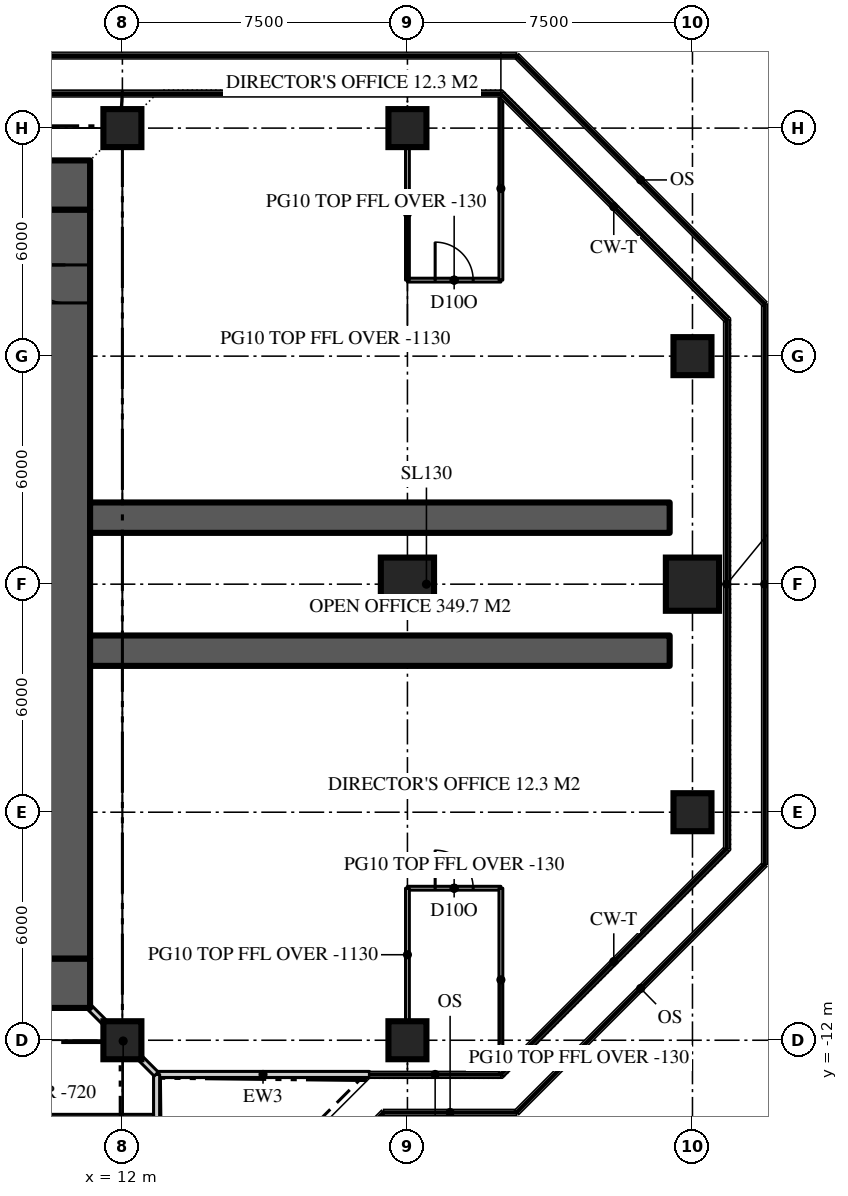
"""IFC4 building model, lengths in metres.
Left out: names, types, materials, properties, quantities, classifications, styles, units other than length and angle.
Written with IfcOpenShell. Run it as: python <this file> out.ifc"""

import sys

from ifc_helpers import new_model, si_unit, direction, frame, frame_2d, origin, origin_2d, place, context, subcontext, project, spatial, rectangle, extrude, element, fill, save


model = new_model("IFC4")
c1 = context("Model", 3, precision=1e-05, world=origin(), true_north=direction((0.0, 1.0)))
c2 = subcontext(c1, "Body", "Model", "MODEL_VIEW")
j1 = project(units=[si_unit("LENGTHUNIT", "METRE"), si_unit("PLANEANGLEUNIT", "RADIAN")], contexts=[c1])
p1 = place(None, origin())
s1 = spatial("IfcSite", under=j1, at=p1, CompositionType="ELEMENT")
p2 = place(p1, origin())
s2 = spatial("IfcBuilding", under=s1, at=p2, CompositionType="ELEMENT")
p3 = place(p2, frame((0.0, 0.0, 282.9)))
s3 = spatial("IfcBuildingStorey", under=s2, at=p3, CompositionType="ELEMENT", Elevation=282.9)
p4 = place(p3, frame((-11.15, 10.5, 0.0), z_axis=(0.0, 0.0, 1.0), x_axis=(1.0, 0.0, 0.0)))
e1 = element("IfcWall", 1, at=p4, inside=s3, PredefinedType="SHEAR", context=c2, shape_type="SweptSolid", body=[
    extrude(rectangle(XDim=22.3, YDim=1.3, at=frame_2d((11.15, 0.0))), origin(), (0.0, 0.0, 1.0), 3.9),
])
p5 = place(p4, frame((4.25, 0.0, 0.0)))
e2 = element("IfcOpeningElement", 2, at=p5, cuts=e1, PredefinedType="OPENING", context=c2, shape_type="SweptSolid", body=[
    extrude(rectangle(XDim=1.8, YDim=2.2, at=frame_2d((0.9, 1.1))), frame((0.0, 0.66, 0.0), z_axis=(0.0, -1.0, 0.0), x_axis=(1.0, 0.0, 0.0)), (0.0, 0.0, 1.0), 1.32),
])
p6 = place(p4, frame((16.25, 0.0, 0.0)))
e3 = element("IfcOpeningElement", 3, at=p6, cuts=e1, PredefinedType="OPENING", context=c2, shape_type="SweptSolid", body=[
    extrude(rectangle(XDim=1.8, YDim=2.2, at=frame_2d((0.9, 1.1))), frame((0.0, 0.66, 0.0), z_axis=(0.0, -1.0, 0.0), x_axis=(1.0, 0.0, 0.0)), (0.0, 0.0, 1.0), 1.32),
])
p7 = place(p3, frame((11.15, -10.5, 0.0), z_axis=(0.0, 0.0, 1.0), x_axis=(-1.0, 0.0, 0.0)))
e4 = element("IfcWall", 4, at=p7, inside=s3, PredefinedType="SHEAR", context=c2, shape_type="SweptSolid", body=[
    extrude(rectangle(XDim=22.3, YDim=1.3, at=frame_2d((11.15, 0.0))), origin(), (0.0, 0.0, 1.0), 3.9),
])
p8 = place(p7, frame((16.25, 0.0, 0.0)))
e5 = element("IfcOpeningElement", 5, at=p8, cuts=e4, PredefinedType="OPENING", context=c2, shape_type="SweptSolid", body=[
    extrude(rectangle(XDim=1.8, YDim=2.2, at=frame_2d((0.9, 1.1))), frame((0.0, 0.66, 0.0), z_axis=(0.0, -1.0, 0.0), x_axis=(1.0, 0.0, 0.0)), (0.0, 0.0, 1.0), 1.32),
])
p9 = place(p7, frame((4.25, 0.0, 0.0)))
e6 = element("IfcOpeningElement", 6, at=p9, cuts=e4, PredefinedType="OPENING", context=c2, shape_type="SweptSolid", body=[
    extrude(rectangle(XDim=1.8, YDim=2.2, at=frame_2d((0.9, 1.1))), frame((0.0, 0.66, 0.0), z_axis=(0.0, -1.0, 0.0), x_axis=(1.0, 0.0, 0.0)), (0.0, 0.0, 1.0), 1.32),
])
p10 = place(p3, frame((10.5, -9.85, 0.0), z_axis=(0.0, 0.0, 1.0), x_axis=(0.0, 1.0, 0.0)))
e7 = element("IfcWall", 7, at=p10, inside=s3, PredefinedType="SHEAR", context=c2, shape_type="SweptSolid", body=[
    extrude(rectangle(XDim=19.7, YDim=1.3, at=frame_2d((9.85, 0.0))), origin(), (0.0, 0.0, 1.0), 3.9),
])
p11 = place(p10, frame((17.25, 0.0, 0.0)))
e8 = element("IfcOpeningElement", 8, at=p11, cuts=e7, PredefinedType="OPENING", context=c2, shape_type="SweptSolid", body=[
    extrude(rectangle(XDim=1.0, YDim=2.2, at=frame_2d((0.5, 1.1))), frame((0.0, 0.66, 0.0), z_axis=(0.0, -1.0, 0.0), x_axis=(1.0, 0.0, 0.0)), (0.0, 0.0, 1.0), 1.32),
])
for number, where, z_axis, x_axis in (
    (9, (11.15, -1.75, 0.0), (0.0, 0.0, 1.0), (1.0, 0.0, 0.0)),
    (10, (11.15, 1.75, 0.0), (0.0, 0.0, 1.0), (1.0, 0.0, 0.0)),
):
    element("IfcWall", number, at=place(p3, frame(where, z_axis=z_axis, x_axis=x_axis)), inside=s3, PredefinedType="SHEAR", context=c2, shape_type="SweptSolid", body=[
        extrude(rectangle(XDim=15.25, YDim=0.8, at=frame_2d((7.625, 0.0))), origin(), (0.0, 0.0, 1.0), 3.9),
    ])
for number, where, z_axis, x_axis in (
    (11, (12.0, -12.0, 0.0), (0.0, 0.0, 1.0), (1.0, 0.0, 0.0)),
    (12, (19.5, -12.0, 0.0), (0.0, 0.0, 1.0), (1.0, 0.0, 0.0)),
    (13, (27.0, -6.0, 0.0), (0.0, 0.0, 1.0), (1.0, 0.0, 0.0)),
):
    element("IfcColumn", number, at=place(p3, frame(where, z_axis=z_axis, x_axis=x_axis)), inside=s3, PredefinedType="COLUMN", context=c2, shape_type="SweptSolid", body=[
        extrude(rectangle(XDim=1.0, YDim=1.0, at=origin_2d()), origin(), (0.0, 0.0, 1.0), 3.9),
    ])
for number, where, z_axis, x_axis in (
    (14, (19.5, 0.0, 0.0), (0.0, 0.0, 1.0), (1.0, 0.0, 0.0)),
    (15, (27.0, 0.0, 0.0), (0.0, 0.0, 1.0), (1.0, 0.0, 0.0)),
):
    element("IfcColumn", number, at=place(p3, frame(where, z_axis=z_axis, x_axis=x_axis)), inside=s3, PredefinedType="COLUMN", context=c2, shape_type="SweptSolid", body=[
        extrude(rectangle(XDim=1.4, YDim=1.4, at=origin_2d()), origin(), (0.0, 0.0, 1.0), 3.9),
    ])
for number, where, z_axis, x_axis in (
    (16, (27.0, 6.0, 0.0), (0.0, 0.0, 1.0), (1.0, 0.0, 0.0)),
    (17, (12.0, 12.0, 0.0), (0.0, 0.0, 1.0), (1.0, 0.0, 0.0)),
    (18, (19.5, 12.0, 0.0), (0.0, 0.0, 1.0), (1.0, 0.0, 0.0)),
):
    element("IfcColumn", number, at=place(p3, frame(where, z_axis=z_axis, x_axis=x_axis)), inside=s3, PredefinedType="COLUMN", context=c2, shape_type="SweptSolid", body=[
        extrude(rectangle(XDim=1.0, YDim=1.0, at=origin_2d()), origin(), (0.0, 0.0, 1.0), 3.9),
    ])
p12 = place(p3, frame((12.9, -12.9, 0.0), z_axis=(0.0, 0.0, 1.0), x_axis=(1.0, 0.0, 0.0)))
e19 = element("IfcWall", 19, at=p12, inside=s3, PredefinedType="SOLIDWALL", context=c2, shape_type="SweptSolid", body=[
    extrude(rectangle(XDim=5.6, YDim=0.16, at=frame_2d((2.8, 0.0))), origin(), (0.0, 0.0, 1.0), 3.77),
])
p13 = place(p3, frame((12.9, -18.5, 0.0), z_axis=(0.0, 0.0, 1.0), x_axis=(0.0, 1.0, 0.0)))
e20 = element("IfcWall", 20, at=p13, inside=s3, PredefinedType="SOLIDWALL", context=c2, shape_type="SweptSolid", body=[
    extrude(rectangle(XDim=5.6, YDim=0.16, at=frame_2d((2.8, 0.0))), origin(), (0.0, 0.0, 1.0), 3.77),
])
p14 = place(p13, frame((2.3, 0.0, 0.0)))
e21 = element("IfcOpeningElement", 21, at=p14, cuts=e20, PredefinedType="OPENING", context=c2, shape_type="SweptSolid", body=[
    extrude(rectangle(XDim=1.0, YDim=2.2, at=frame_2d((0.5, 1.1))), frame((0.0, 0.09, 0.0), z_axis=(0.0, -1.0, 0.0), x_axis=(1.0, 0.0, 0.0)), (0.0, 0.0, 1.0), 0.18),
])
p15 = place(p3, frame((19.5, 8.0, 0.0), z_axis=(0.0, 0.0, 1.0), x_axis=(1.0, 0.0, 0.0)))
e22 = element("IfcWall", 22, at=p15, inside=s3, PredefinedType="PARTITIONING", context=c2, shape_type="SweptSolid", body=[
    extrude(rectangle(XDim=2.459, YDim=0.1, at=frame_2d((1.229, 0.0))), origin(), (0.0, 0.0, 1.0), 3.77),
])
p16 = place(p15, frame((0.729, 0.0, 0.0)))
e23 = element("IfcOpeningElement", 23, at=p16, cuts=e22, PredefinedType="OPENING", context=c2, shape_type="SweptSolid", body=[
    extrude(rectangle(XDim=1.0, YDim=2.2, at=frame_2d((0.5, 1.1))), frame((0.0, 0.06, 0.0), z_axis=(0.0, -1.0, 0.0), x_axis=(1.0, 0.0, 0.0)), (0.0, 0.0, 1.0), 0.12),
])
p17 = place(p3, frame((19.5, 8.0, 0.0), z_axis=(0.0, 0.0, 1.0), x_axis=(0.0, 1.0, 0.0)))
e24 = element("IfcWall", 24, at=p17, inside=s3, PredefinedType="PARTITIONING", context=c2, shape_type="SweptSolid", body=[
    extrude(rectangle(XDim=3.5, YDim=0.1, at=frame_2d((1.75, 0.0))), origin(), (0.0, 0.0, 1.0), 2.77),
])
p18 = place(p3, frame((21.959, 8.0, 0.0), z_axis=(0.0, 0.0, 1.0), x_axis=(0.0, 1.0, 0.0)))
e25 = element("IfcWall", 25, at=p18, inside=s3, PredefinedType="PARTITIONING", context=c2, shape_type="SweptSolid", body=[
    extrude(rectangle(XDim=4.82, YDim=0.1, at=frame_2d((2.41, 0.0))), origin(), (0.0, 0.0, 1.0), 3.77),
])
p19 = place(p3, frame((19.5, -8.0, 0.0), z_axis=(0.0, 0.0, 1.0), x_axis=(1.0, 0.0, 0.0)))
e26 = element("IfcWall", 26, at=p19, inside=s3, PredefinedType="PARTITIONING", context=c2, shape_type="SweptSolid", body=[
    extrude(rectangle(XDim=2.459, YDim=0.1, at=frame_2d((1.229, 0.0))), origin(), (0.0, 0.0, 1.0), 3.77),
])
p20 = place(p19, frame((0.729, 0.0, 0.0)))
e27 = element("IfcOpeningElement", 27, at=p20, cuts=e26, PredefinedType="OPENING", context=c2, shape_type="SweptSolid", body=[
    extrude(rectangle(XDim=1.0, YDim=2.2, at=frame_2d((0.5, 1.1))), frame((0.0, 0.06, 0.0), z_axis=(0.0, -1.0, 0.0), x_axis=(1.0, 0.0, 0.0)), (0.0, 0.0, 1.0), 0.12),
])
p21 = place(p3, frame((19.5, -8.0, 0.0), z_axis=(0.0, 0.0, 1.0), x_axis=(0.0, -1.0, 0.0)))
e28 = element("IfcWall", 28, at=p21, inside=s3, PredefinedType="PARTITIONING", context=c2, shape_type="SweptSolid", body=[
    extrude(rectangle(XDim=3.5, YDim=0.1, at=frame_2d((1.75, 0.0))), origin(), (0.0, 0.0, 1.0), 2.77),
])
p22 = place(p3, frame((21.959, -8.0, 0.0), z_axis=(0.0, 0.0, 1.0), x_axis=(0.0, -1.0, 0.0)))
e29 = element("IfcWall", 29, at=p22, inside=s3, PredefinedType="PARTITIONING", context=c2, shape_type="SweptSolid", body=[
    extrude(rectangle(XDim=4.82, YDim=0.1, at=frame_2d((2.41, 0.0))), origin(), (0.0, 0.0, 1.0), 3.77),
])
p23 = place(p3, frame((4.0, -14.0, 0.0), z_axis=(0.0, 0.0, 1.0), x_axis=(1.0, 0.0, 0.0)))
e30 = element("IfcWall", 30, at=p23, inside=s3, PredefinedType="PARTITIONING", context=c2, shape_type="SweptSolid", body=[
    extrude(rectangle(XDim=8.82, YDim=0.1, at=frame_2d((4.41, 0.0))), origin(), (0.0, 0.0, 1.0), 3.18),
])
p24 = place(p3, frame((11.15, -11.15, 0.0), z_axis=(0.0, 0.0, 1.0), x_axis=(0.707106781187, -0.707106781187, 0.0)))
e31 = element("IfcWall", 31, at=p24, inside=s3, PredefinedType="PARTITIONING", context=c2, shape_type="SweptSolid", body=[
    extrude(rectangle(XDim=2.461, YDim=0.15, at=frame_2d((1.23, 0.0))), origin(), (0.0, 0.0, 1.0), 3.22),
])
p25 = place(p11, origin())
e32 = element("IfcDoor", 32, at=p25, inside=s3, OperationType="SINGLE_SWING_RIGHT", PredefinedType="DOOR", context=c2, shape_type="SweptSolid", body=[
    extrude(rectangle(XDim=1.0, YDim=2.2, at=frame_2d((0.5, 1.1))), frame((0.0, 0.025, 0.0), z_axis=(0.0, -1.0, 0.0), x_axis=(1.0, 0.0, 0.0)), (0.0, 0.0, 1.0), 0.05),
])
fill(e8, e32)
p26 = place(p16, origin())
e33 = element("IfcDoor", 33, at=p26, inside=s3, OperationType="SINGLE_SWING_LEFT", PredefinedType="DOOR", context=c2, shape_type="SweptSolid", body=[
    extrude(rectangle(XDim=1.0, YDim=2.2, at=frame_2d((0.5, 1.1))), frame((0.0, 0.025, 0.0), z_axis=(0.0, -1.0, 0.0), x_axis=(1.0, 0.0, 0.0)), (0.0, 0.0, 1.0), 0.05),
])
fill(e23, e33)
p27 = place(p20, origin())
e34 = element("IfcDoor", 34, at=p27, inside=s3, OperationType="SINGLE_SWING_LEFT", PredefinedType="DOOR", context=c2, shape_type="SweptSolid", body=[
    extrude(rectangle(XDim=1.0, YDim=2.2, at=frame_2d((0.5, 1.1))), frame((0.0, 0.025, 0.0), z_axis=(0.0, -1.0, 0.0), x_axis=(1.0, 0.0, 0.0)), (0.0, 0.0, 1.0), 0.05),
])
fill(e27, e34)
save(model, sys.argv[1])
